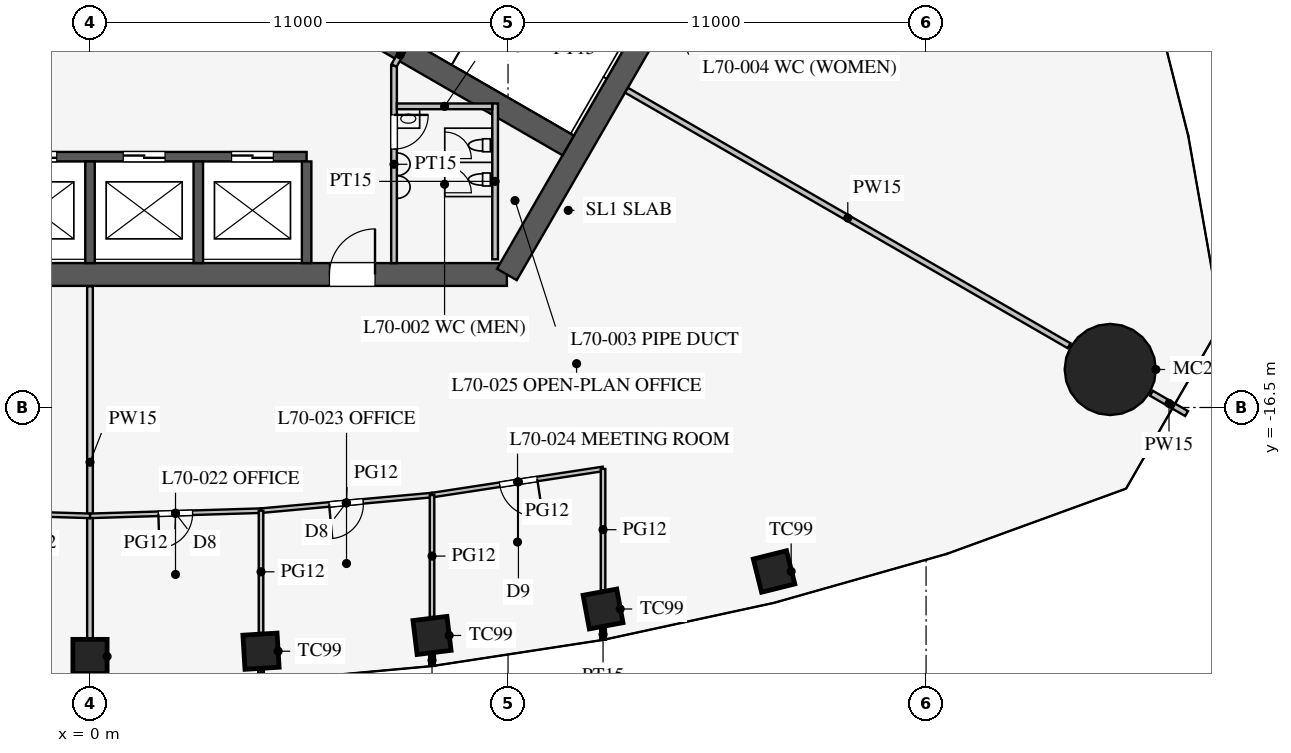
"""IFC4 building model, lengths in metres.
Left out: names, types, materials, properties, quantities, classifications, styles, units other than length and angle.
Written with IfcOpenShell. Run it as: python <this file> out.ifc"""

import sys

from ifc_helpers import new_model, si_unit, direction, frame, frame_2d, origin, origin_2d, place, context, subcontext, project, spatial, rectangle, circle, extrude, element, fill, save


model = new_model("IFC4")
c1 = context("Model", 3, precision=1e-05, world=origin(), true_north=direction((0.0, 1.0)))
c2 = subcontext(c1, "Body", "Model", "MODEL_VIEW")
j1 = project(units=[si_unit("LENGTHUNIT", "METRE"), si_unit("PLANEANGLEUNIT", "RADIAN")], contexts=[c1])
p1 = place(None, origin())
s1 = spatial("IfcSite", under=j1, at=p1, CompositionType="ELEMENT")
p2 = place(p1, origin())
s2 = spatial("IfcBuilding", under=s1, at=p2, CompositionType="ELEMENT")
p3 = place(p2, frame((0.0, 0.0, 305.7)))
s3 = spatial("IfcBuildingStorey", under=s2, at=p3, CompositionType="ELEMENT", Elevation=305.7)
for number, where, z_axis, x_axis in (
    (1, (0.0, -23.052, 0.0), (0.0, 0.0, 1.0), (1.0, 0.0, 0.0)),
    (2, (4.5, -22.914, 0.0), (0.0, 0.0, 1.0), (0.998, 0.061, 0.0)),
    (3, (9.0, -22.499, 0.0), (0.0, 0.0, 1.0), (0.993, 0.121, 0.0)),
    (4, (13.5, -21.803, 0.0), (0.0, 0.0, 1.0), (0.983, 0.182, 0.0)),
    (5, (18.0, -20.816, 0.0), (0.0, 0.0, 1.0), (0.97, 0.242, 0.0)),
):
    element("IfcColumn", number, at=place(p3, frame(where, z_axis=z_axis, x_axis=x_axis)), inside=s3, PredefinedType="COLUMN", context=c2, shape_type="SweptSolid", body=[
        extrude(rectangle(XDim=0.9, YDim=0.9, at=origin_2d()), origin(), (0.0, 0.0, 1.0), 4.2),
    ])
p4 = place(p3, frame((26.847, -15.5, 0.0), z_axis=(0.0, 0.0, 1.0), x_axis=(1.0, 0.0, 0.0)))
e6 = element("IfcColumn", 6, at=p4, inside=s3, PredefinedType="COLUMN", context=c2, shape_type="SweptSolid", body=[
    extrude(circle(Radius=1.2, at=origin_2d()), origin(), (0.0, 0.0, 1.0), 4.2),
])
p5 = place(p3, frame((-10.97, -13.0, 0.0), z_axis=(0.0, 0.0, 1.0), x_axis=(1.0, 0.0, 0.0)))
e7 = element("IfcWall", 7, at=p5, inside=s3, PredefinedType="SHEAR", context=c2, shape_type="SweptSolid", body=[
    extrude(rectangle(XDim=21.939, YDim=0.6, at=frame_2d((10.97, 0.0))), origin(), (0.0, 0.0, 1.0), 4.2),
])
p6 = place(p5, frame((17.27, 0.0, 0.0)))
e8 = element("IfcOpeningElement", 8, at=p6, cuts=e7, PredefinedType="OPENING", context=c2, shape_type="SweptSolid", body=[
    extrude(rectangle(XDim=1.2, YDim=2.1, at=frame_2d((0.6, 1.05))), frame((0.0, 0.31, 0.0), z_axis=(0.0, -1.0, 0.0), x_axis=(1.0, 0.0, 0.0)), (0.0, 0.0, 1.0), 0.62),
])
p7 = place(p5, frame((3.47, 0.0, 0.0)))
e9 = element("IfcOpeningElement", 9, at=p7, cuts=e7, PredefinedType="OPENING", context=c2, shape_type="SweptSolid", body=[
    extrude(rectangle(XDim=1.2, YDim=2.1, at=frame_2d((0.6, 1.05))), frame((0.0, 0.31, 0.0), z_axis=(0.0, -1.0, 0.0), x_axis=(1.0, 0.0, 0.0)), (0.0, 0.0, 1.0), 0.62),
])
p8 = place(p3, frame((10.97, -13.0, 0.0), z_axis=(0.0, 0.0, 1.0), x_axis=(0.499995765644, 0.866027848477, 0.0)))
e10 = element("IfcWall", 10, at=p8, inside=s3, PredefinedType="SHEAR", context=c2, shape_type="SweptSolid", body=[
    extrude(rectangle(XDim=11.547, YDim=0.6, at=frame_2d((5.773, 0.0))), origin(), (0.0, 0.0, 1.0), 4.2),
])
p9 = place(p3, frame((-5.7, -9.9, 0.0), z_axis=(0.0, 0.0, 1.0), x_axis=(1.0, 0.0, 0.0)))
e11 = element("IfcWall", 11, at=p9, inside=s3, PredefinedType="SHEAR", context=c2, shape_type="SweptSolid", body=[
    extrude(rectangle(XDim=11.4, YDim=0.25, at=frame_2d((5.7, 0.0))), origin(), (0.0, 0.0, 1.0), 4.2),
])
p10 = place(p9, frame((0.875, 0.0, 0.0)))
e12 = element("IfcOpeningElement", 12, at=p10, cuts=e11, PredefinedType="OPENING", context=c2, shape_type="SweptSolid", body=[
    extrude(rectangle(XDim=1.1, YDim=2.2, at=frame_2d((0.55, 1.1))), frame((0.0, 0.135, 0.0), z_axis=(0.0, -1.0, 0.0), x_axis=(1.0, 0.0, 0.0)), (0.0, 0.0, 1.0), 0.27),
])
p11 = place(p9, frame((3.725, 0.0, 0.0)))
e13 = element("IfcOpeningElement", 13, at=p11, cuts=e11, PredefinedType="OPENING", context=c2, shape_type="SweptSolid", body=[
    extrude(rectangle(XDim=1.1, YDim=2.2, at=frame_2d((0.55, 1.1))), frame((0.0, 0.135, 0.0), z_axis=(0.0, -1.0, 0.0), x_axis=(1.0, 0.0, 0.0)), (0.0, 0.0, 1.0), 0.27),
])
p12 = place(p9, frame((6.575, 0.0, 0.0)))
e14 = element("IfcOpeningElement", 14, at=p12, cuts=e11, PredefinedType="OPENING", context=c2, shape_type="SweptSolid", body=[
    extrude(rectangle(XDim=1.1, YDim=2.2, at=frame_2d((0.55, 1.1))), frame((0.0, 0.135, 0.0), z_axis=(0.0, -1.0, 0.0), x_axis=(1.0, 0.0, 0.0)), (0.0, 0.0, 1.0), 0.27),
])
p13 = place(p9, frame((9.425, 0.0, 0.0)))
e15 = element("IfcOpeningElement", 15, at=p13, cuts=e11, PredefinedType="OPENING", context=c2, shape_type="SweptSolid", body=[
    extrude(rectangle(XDim=1.1, YDim=2.2, at=frame_2d((0.55, 1.1))), frame((0.0, 0.135, 0.0), z_axis=(0.0, -1.0, 0.0), x_axis=(1.0, 0.0, 0.0)), (0.0, 0.0, 1.0), 0.27),
])
for number, where, z_axis, x_axis in (
    (16, (0.0, -10.025, 0.0), (0.0, 0.0, 1.0), (0.0, -1.0, 0.0)),
    (17, (2.85, -10.025, 0.0), (0.0, 0.0, 1.0), (0.0, -1.0, 0.0)),
    (18, (5.7, -10.025, 0.0), (0.0, 0.0, 1.0), (0.0, -1.0, 0.0)),
):
    element("IfcWall", number, at=place(p3, frame(where, z_axis=z_axis, x_axis=x_axis)), inside=s3, PredefinedType="SHEAR", context=c2, shape_type="SweptSolid", body=[
        extrude(rectangle(XDim=2.675, YDim=0.25, at=frame_2d((1.337, 0.0))), origin(), (0.0, 0.0, 1.0), 4.2),
    ])
p14 = place(p3, frame((4.638, -5.016, 0.0), z_axis=(0.0, 0.0, 1.0), x_axis=(0.866012320003, -0.50002266109, 0.0)))
e19 = element("IfcWall", 19, at=p14, inside=s3, PredefinedType="SHEAR", context=c2, shape_type="SweptSolid", body=[
    extrude(rectangle(XDim=9.175, YDim=0.6, at=frame_2d((4.587, 0.0))), origin(), (0.0, 0.0, 1.0), 4.2),
])
p15 = place(p3, frame((8.0, -7.5, 0.0), z_axis=(0.0, 0.0, 1.0), x_axis=(0.0, -1.0, 0.0)))
e20 = element("IfcWall", 20, at=p15, inside=s3, PredefinedType="PARTITIONING", context=c2, shape_type="SweptSolid", body=[
    extrude(rectangle(XDim=5.2, YDim=0.15, at=frame_2d((2.6, 0.0))), origin(), (0.0, 0.0, 1.0), 4.0),
])
p16 = place(p15, frame((1.3, 0.0, 0.0)))
e21 = element("IfcOpeningElement", 21, at=p16, cuts=e20, PredefinedType="OPENING", context=c2, shape_type="SweptSolid", body=[
    extrude(rectangle(XDim=0.9, YDim=2.1, at=frame_2d((0.45, 1.05))), frame((0.0, 0.085, 0.0), z_axis=(0.0, -1.0, 0.0), x_axis=(1.0, 0.0, 0.0)), (0.0, 0.0, 1.0), 0.17),
])
p17 = place(p3, frame((8.0, -7.5, 0.0), z_axis=(0.0, 0.0, 1.0), x_axis=(0.499842556608, 0.866116284689, 0.0)))
e22 = element("IfcWall", 22, at=p17, inside=s3, PredefinedType="PARTITIONING", context=c2, shape_type="SweptSolid", body=[
    extrude(rectangle(XDim=0.645, YDim=0.15, at=frame_2d((0.323, 0.0))), origin(), (0.0, 0.0, 1.0), 4.0),
])
p18 = place(p3, frame((10.66, -8.5, 0.0), z_axis=(0.0, 0.0, 1.0), x_axis=(0.0, -1.0, 0.0)))
e23 = element("IfcWall", 23, at=p18, inside=s3, PredefinedType="PARTITIONING", context=c2, shape_type="SweptSolid", body=[
    extrude(rectangle(XDim=4.1, YDim=0.15, at=frame_2d((2.05, 0.0))), origin(), (0.0, 0.0, 1.0), 4.0),
])
p19 = place(p3, frame((8.075, -8.575, 0.0), z_axis=(0.0, 0.0, 1.0), x_axis=(1.0, 0.0, 0.0)))
e24 = element("IfcWall", 24, at=p19, inside=s3, PredefinedType="PARTITIONING", context=c2, shape_type="SweptSolid", body=[
    extrude(rectangle(XDim=2.51, YDim=0.15, at=frame_2d((1.255, 0.0))), origin(), (0.0, 0.0, 1.0), 4.0),
])
p20 = place(p3, frame((14.116, -8.15, 0.0), z_axis=(0.0, 0.0, 1.0), x_axis=(0.866020541135, -0.500008422262, 0.0)))
e25 = element("IfcWall", 25, at=p20, inside=s3, PredefinedType="PARTITIONING", context=c2, shape_type="SweptSolid", body=[
    extrude(rectangle(XDim=13.45, YDim=0.15, at=frame_2d((6.725, 0.0))), origin(), (0.0, 0.0, 1.0), 2.5),
])
p21 = place(p3, frame((27.929, -16.125, 0.0), z_axis=(0.0, 0.0, 1.0), x_axis=(0.866086810508, -0.499893625349, 0.0)))
e26 = element("IfcWall", 26, at=p21, inside=s3, PredefinedType="PARTITIONING", context=c2, shape_type="SweptSolid", body=[
    extrude(rectangle(XDim=1.07, YDim=0.15, at=frame_2d((0.535, 0.0))), origin(), (0.0, 0.0, 1.0), 2.5),
])
p22 = place(p3, frame((0.0, -13.31, 0.0), z_axis=(0.0, 0.0, 1.0), x_axis=(0.0, -1.0, 0.0)))
e27 = element("IfcWall", 27, at=p22, inside=s3, PredefinedType="PARTITIONING", context=c2, shape_type="SweptSolid", body=[
    extrude(rectangle(XDim=9.261, YDim=0.15, at=frame_2d((4.631, 0.0))), origin(), (0.0, 0.0, 1.0), 3.3),
])
p23 = place(p3, frame((13.5, -22.331, 0.0), z_axis=(0.0, 0.0, 1.0), x_axis=(0.0, -1.0, 0.0)))
e28 = element("IfcWall", 28, at=p23, inside=s3, PredefinedType="PARTITIONING", context=c2, shape_type="SweptSolid", body=[
    extrude(rectangle(XDim=0.28, YDim=0.15, at=frame_2d((0.14, 0.0))), origin(), (0.0, 0.0, 1.0), 2.9),
])
p24 = place(p3, frame((4.5, -23.394, 0.0), z_axis=(0.0, 0.0, 1.0), x_axis=(0.0, -1.0, 0.0)))
e29 = element("IfcWall", 29, at=p24, inside=s3, PredefinedType="PARTITIONING", context=c2, shape_type="SweptSolid", body=[
    extrude(rectangle(XDim=0.316, YDim=0.15, at=frame_2d((0.158, 0.0))), origin(), (0.0, 0.0, 1.0), 2.9),
])
p25 = place(p3, frame((9.0, -23.004, 0.0), z_axis=(0.0, 0.0, 1.0), x_axis=(0.0, -1.0, 0.0)))
e30 = element("IfcWall", 30, at=p25, inside=s3, PredefinedType="PARTITIONING", context=c2, shape_type="SweptSolid", body=[
    extrude(rectangle(XDim=0.296, YDim=0.15, at=frame_2d((0.148, 0.0))), origin(), (0.0, 0.0, 1.0), 2.9),
])
p26 = place(p3, frame((0.0, -19.352, 0.0), z_axis=(0.0, 0.0, 1.0), x_axis=(0.999542074227, 0.030259574513, 0.0)))
e31 = element("IfcWall", 31, at=p26, inside=s3, PredefinedType="PARTITIONING", context=c2, shape_type="SweptSolid", body=[
    extrude(rectangle(XDim=4.502, YDim=0.12, at=frame_2d((2.251, 0.0))), origin(), (0.0, 0.0, 1.0), 2.9),
])
p27 = place(p26, frame((1.8, 0.0, 0.15)))
e32 = element("IfcOpeningElement", 32, at=p27, cuts=e31, PredefinedType="OPENING", context=c2, shape_type="SweptSolid", body=[
    extrude(rectangle(XDim=0.9, YDim=2.1, at=frame_2d((0.45, 1.05))), frame((0.0, 0.07, 0.0), z_axis=(0.0, -1.0, 0.0), x_axis=(1.0, 0.0, 0.0)), (0.0, 0.0, 1.0), 0.14),
])
p28 = place(p3, frame((4.5, -19.215, 0.0), z_axis=(0.0, 0.0, 1.0), x_axis=(0.995871921504, 0.090769576179, 0.0)))
e33 = element("IfcWall", 33, at=p28, inside=s3, PredefinedType="PARTITIONING", context=c2, shape_type="SweptSolid", body=[
    extrude(rectangle(XDim=4.519, YDim=0.12, at=frame_2d((2.259, 0.0))), origin(), (0.0, 0.0, 1.0), 2.9),
])
p29 = place(p28, frame((1.8, 0.0, 0.15)))
e34 = element("IfcOpeningElement", 34, at=p29, cuts=e33, PredefinedType="OPENING", context=c2, shape_type="SweptSolid", body=[
    extrude(rectangle(XDim=0.9, YDim=2.1, at=frame_2d((0.45, 1.05))), frame((0.0, 0.07, 0.0), z_axis=(0.0, -1.0, 0.0), x_axis=(1.0, 0.0, 0.0)), (0.0, 0.0, 1.0), 0.14),
])
p30 = place(p3, frame((9.0, -18.805, 0.0), z_axis=(0.0, 0.0, 1.0), x_axis=(0.988481794406, 0.151339823341, 0.0)))
e35 = element("IfcWall", 35, at=p30, inside=s3, PredefinedType="PARTITIONING", context=c2, shape_type="SweptSolid", body=[
    extrude(rectangle(XDim=4.552, YDim=0.12, at=frame_2d((2.276, 0.0))), origin(), (0.0, 0.0, 1.0), 2.9),
])
p31 = place(p30, frame((1.8, 0.0, 0.15)))
e36 = element("IfcOpeningElement", 36, at=p31, cuts=e35, PredefinedType="OPENING", context=c2, shape_type="SweptSolid", body=[
    extrude(rectangle(XDim=1.0, YDim=2.1, at=frame_2d((0.5, 1.05))), frame((0.0, 0.07, 0.0), z_axis=(0.0, -1.0, 0.0), x_axis=(1.0, 0.0, 0.0)), (0.0, 0.0, 1.0), 0.14),
])
p32 = place(p3, frame((-4.5, -19.215, 0.0), z_axis=(0.0, 0.0, 1.0), x_axis=(0.999542074227, -0.030259574513, 0.0)))
e37 = element("IfcWall", 37, at=p32, inside=s3, PredefinedType="PARTITIONING", context=c2, shape_type="SweptSolid", body=[
    extrude(rectangle(XDim=4.502, YDim=0.12, at=frame_2d((2.251, 0.0))), origin(), (0.0, 0.0, 1.0), 2.9),
])
p33 = place(p32, frame((1.8, 0.0, 0.15)))
e38 = element("IfcOpeningElement", 38, at=p33, cuts=e37, PredefinedType="OPENING", context=c2, shape_type="SweptSolid", body=[
    extrude(rectangle(XDim=0.9, YDim=2.1, at=frame_2d((0.45, 1.05))), frame((0.0, 0.07, 0.0), z_axis=(0.0, -1.0, 0.0), x_axis=(1.0, 0.0, 0.0)), (0.0, 0.0, 1.0), 0.14),
])
p34 = place(p3, frame((13.5, -18.116, 0.0), z_axis=(0.0, 0.0, 1.0), x_axis=(0.0, -1.0, 0.0)))
e39 = element("IfcWall", 39, at=p34, inside=s3, PredefinedType="PARTITIONING", context=c2, shape_type="SweptSolid", body=[
    extrude(rectangle(XDim=3.198, YDim=0.12, at=frame_2d((1.599, 0.0))), origin(), (0.0, 0.0, 1.0), 2.9),
])
p35 = place(p3, frame((4.5, -19.215, 0.0), z_axis=(0.0, 0.0, 1.0), x_axis=(0.0, -1.0, 0.0)))
e40 = element("IfcWall", 40, at=p35, inside=s3, PredefinedType="PARTITIONING", context=c2, shape_type="SweptSolid", body=[
    extrude(rectangle(XDim=3.218, YDim=0.12, at=frame_2d((1.609, 0.0))), origin(), (0.0, 0.0, 1.0), 2.9),
])
p36 = place(p3, frame((9.0, -18.805, 0.0), z_axis=(0.0, 0.0, 1.0), x_axis=(0.0, -1.0, 0.0)))
e41 = element("IfcWall", 41, at=p36, inside=s3, PredefinedType="PARTITIONING", context=c2, shape_type="SweptSolid", body=[
    extrude(rectangle(XDim=3.21, YDim=0.12, at=frame_2d((1.605, 0.0))), origin(), (0.0, 0.0, 1.0), 2.9),
])
p37 = place(p16, origin())
e42 = element("IfcDoor", 42, at=p37, inside=s3, OperationType="SINGLE_SWING_LEFT", PredefinedType="DOOR", context=c2, shape_type="SweptSolid", body=[
    extrude(rectangle(XDim=0.9, YDim=2.1, at=frame_2d((0.45, 1.05))), frame((0.0, 0.025, 0.0), z_axis=(0.0, -1.0, 0.0), x_axis=(1.0, 0.0, 0.0)), (0.0, 0.0, 1.0), 0.05),
])
fill(e21, e42)
p38 = place(p6, origin())
e43 = element("IfcDoor", 43, at=p38, inside=s3, OperationType="SINGLE_SWING_RIGHT", PredefinedType="DOOR", context=c2, shape_type="SweptSolid", body=[
    extrude(rectangle(XDim=1.2, YDim=2.1, at=frame_2d((0.6, 1.05))), frame((0.0, 0.025, 0.0), z_axis=(0.0, -1.0, 0.0), x_axis=(1.0, 0.0, 0.0)), (0.0, 0.0, 1.0), 0.05),
])
fill(e8, e43)
p39 = place(p27, frame((0.9, 0.0, 0.0), z_axis=(0.0, 0.0, 1.0), x_axis=(-1.0, 0.0, 0.0)))
e44 = element("IfcDoor", 44, at=p39, inside=s3, OperationType="SINGLE_SWING_RIGHT", PredefinedType="DOOR", context=c2, shape_type="SweptSolid", body=[
    extrude(rectangle(XDim=0.9, YDim=2.1, at=frame_2d((0.45, 1.05))), frame((0.0, 0.025, 0.0), z_axis=(0.0, -1.0, 0.0), x_axis=(1.0, 0.0, 0.0)), (0.0, 0.0, 1.0), 0.05),
])
fill(e32, e44)
p40 = place(p29, frame((0.9, 0.0, 0.0), z_axis=(0.0, 0.0, 1.0), x_axis=(-1.0, 0.0, 0.0)))
e45 = element("IfcDoor", 45, at=p40, inside=s3, OperationType="SINGLE_SWING_RIGHT", PredefinedType="DOOR", context=c2, shape_type="SweptSolid", body=[
    extrude(rectangle(XDim=0.9, YDim=2.1, at=frame_2d((0.45, 1.05))), frame((0.0, 0.025, 0.0), z_axis=(0.0, -1.0, 0.0), x_axis=(1.0, 0.0, 0.0)), (0.0, 0.0, 1.0), 0.05),
])
fill(e34, e45)
p41 = place(p31, frame((1.0, 0.0, 0.0), z_axis=(0.0, 0.0, 1.0), x_axis=(-1.0, 0.0, 0.0)))
e46 = element("IfcDoor", 46, at=p41, inside=s3, OperationType="SINGLE_SWING_LEFT", PredefinedType="DOOR", context=c2, shape_type="SweptSolid", body=[
    extrude(rectangle(XDim=1.0, YDim=2.1, at=frame_2d((0.5, 1.05))), frame((0.0, 0.025, 0.0), z_axis=(0.0, -1.0, 0.0), x_axis=(1.0, 0.0, 0.0)), (0.0, 0.0, 1.0), 0.05),
])
fill(e36, e46)
p42 = place(p11, origin())
e47 = element("IfcDoor", 47, at=p42, inside=s3, OperationType="DOUBLE_DOOR_SLIDING", PredefinedType="DOOR", context=c2, shape_type="SweptSolid", body=[
    extrude(rectangle(XDim=1.1, YDim=2.2, at=frame_2d((0.55, 1.1))), frame((0.0, 0.025, 0.0), z_axis=(0.0, -1.0, 0.0), x_axis=(1.0, 0.0, 0.0)), (0.0, 0.0, 1.0), 0.05),
])
fill(e13, e47)
p43 = place(p12, origin())
e48 = element("IfcDoor", 48, at=p43, inside=s3, OperationType="DOUBLE_DOOR_SLIDING", PredefinedType="DOOR", context=c2, shape_type="SweptSolid", body=[
    extrude(rectangle(XDim=1.1, YDim=2.2, at=frame_2d((0.55, 1.1))), frame((0.0, 0.025, 0.0), z_axis=(0.0, -1.0, 0.0), x_axis=(1.0, 0.0, 0.0)), (0.0, 0.0, 1.0), 0.05),
])
fill(e14, e48)
p44 = place(p13, origin())
e49 = element("IfcDoor", 49, at=p44, inside=s3, OperationType="DOUBLE_DOOR_SLIDING", PredefinedType="DOOR", context=c2, shape_type="SweptSolid", body=[
    extrude(rectangle(XDim=1.1, YDim=2.2, at=frame_2d((0.55, 1.1))), frame((0.0, 0.025, 0.0), z_axis=(0.0, -1.0, 0.0), x_axis=(1.0, 0.0, 0.0)), (0.0, 0.0, 1.0), 0.05),
])
fill(e15, e49)
save(model, sys.argv[1])
